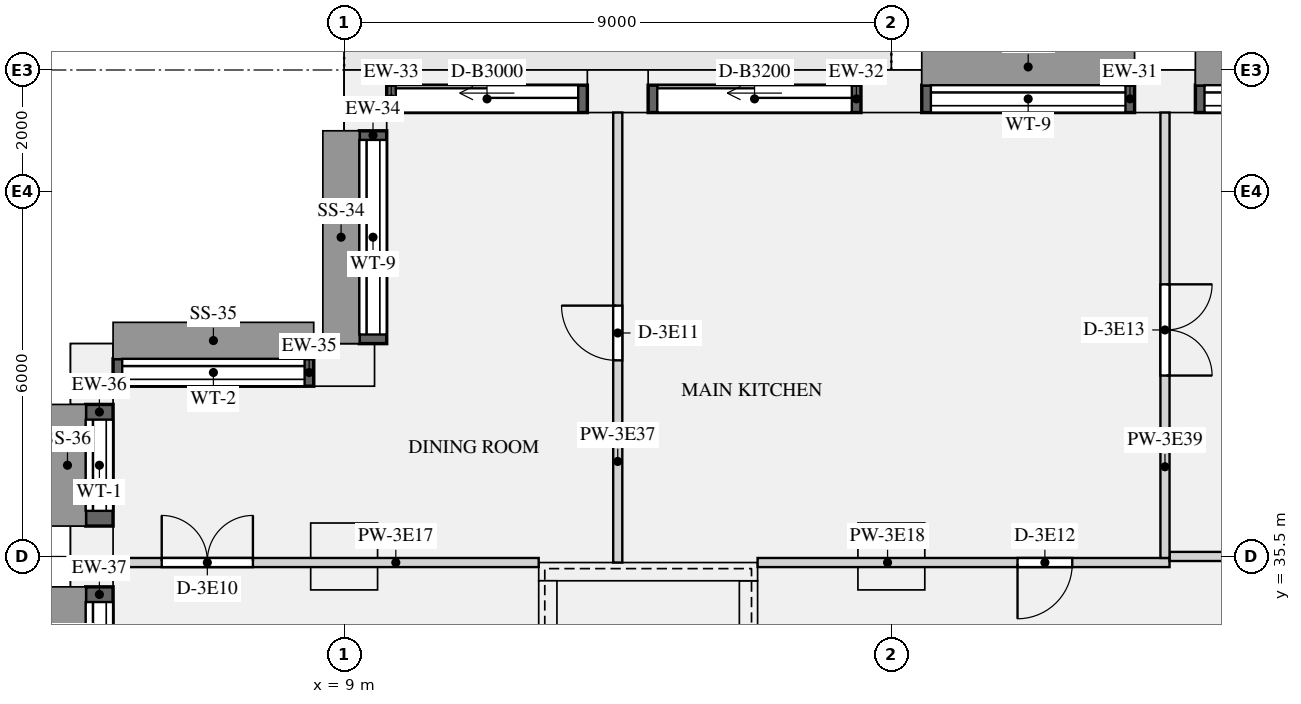
"""IFC4 building model, lengths in metres.
Left out: names, types, materials, properties, quantities, classifications, styles, units other than length and angle.
Written with IfcOpenShell. Run it as: python <this file> out.ifc"""

import sys

from ifc_helpers import new_model, si_unit, direction, frame, frame_2d, origin, origin_2d, place, context, subcontext, project, spatial, rectangle, extrude, element, fill, save


model = new_model("IFC4")
c1 = context("Model", 3, precision=1e-05, world=origin(), true_north=direction((0.0, 1.0)))
c2 = subcontext(c1, "Body", "Model", "MODEL_VIEW")
j1 = project(units=[si_unit("LENGTHUNIT", "METRE"), si_unit("PLANEANGLEUNIT", "RADIAN")], contexts=[c1])
p1 = place(None, origin())
s1 = spatial("IfcSite", under=j1, at=p1, CompositionType="ELEMENT")
p2 = place(p1, origin())
s2 = spatial("IfcBuilding", under=s1, at=p2, CompositionType="ELEMENT")
p3 = place(p2, frame((0.0, 0.0, 172.8)))
s3 = spatial("IfcBuildingStorey", under=s2, at=p3, CompositionType="ELEMENT", Elevation=172.8)
for number, where, z_axis, x_axis in (
    (1, (22.5, 43.15, 0.0), (0.0, 0.0, 1.0), (-1.0, 0.0, 0.0)),
    (2, (18.0, 43.15, 0.0), (0.0, 0.0, 1.0), (-1.0, 0.0, 0.0)),
    (3, (13.5, 43.15, 0.0), (0.0, 0.0, 1.0), (-1.0, 0.0, 0.0)),
    (4, (9.35, 43.0, 0.0), (0.0, 0.0, 1.0), (0.0, -1.0, 0.0)),
    (5, (9.0, 38.65, 0.0), (0.0, 0.0, 1.0), (-1.0, 0.0, 0.0)),
    (6, (4.85, 38.5, 0.0), (0.0, 0.0, 1.0), (0.0, -1.0, 0.0)),
    (7, (4.85, 35.5, 0.0), (0.0, 0.0, 1.0), (0.0, -1.0, 0.0)),
):
    element("IfcColumn", number, at=place(p3, frame(where, z_axis=z_axis, x_axis=x_axis)), inside=s3, PredefinedType="USERDEFINED", context=c2, shape_type="SweptSolid", body=[
        extrude(rectangle(XDim=1.0, YDim=0.7, at=origin_2d()), origin(), (0.0, 0.0, 1.0), 3.15),
    ])
for number, where, z_axis, x_axis in (
    (8, (9.0, 35.5, 0.0), (0.0, 0.0, 1.0), (1.0, 0.0, 0.0)),
    (9, (18.0, 35.5, 0.0), (0.0, 0.0, 1.0), (1.0, 0.0, 0.0)),
):
    element("IfcColumn", number, at=place(p3, frame(where, z_axis=z_axis, x_axis=x_axis)), inside=s3, PredefinedType="COLUMN", context=c2, shape_type="SweptSolid", body=[
        extrude(rectangle(XDim=1.1, YDim=1.1, at=origin_2d()), origin(), (0.0, 0.0, 1.0), 3.15),
    ])
p4 = place(p3, frame((12.2, 35.25, 0.0), z_axis=(0.0, 0.0, 1.0), x_axis=(1.0, 0.0, 0.0)))
e10 = element("IfcWall", 10, at=p4, inside=s3, PredefinedType="SHEAR", context=c2, shape_type="SweptSolid", body=[
    extrude(rectangle(XDim=3.6, YDim=0.3, at=frame_2d((1.8, 0.0))), origin(), (0.0, 0.0, 1.0), 3.15),
])
for number, where, z_axis, x_axis in (
    (11, (12.35, 27.3, 0.0), (0.0, 0.0, 1.0), (0.0, 1.0, 0.0)),
    (12, (15.65, 27.3, 0.0), (0.0, 0.0, 1.0), (0.0, 1.0, 0.0)),
):
    element("IfcWall", number, at=place(p3, frame(where, z_axis=z_axis, x_axis=x_axis)), inside=s3, PredefinedType="SHEAR", context=c2, shape_type="SweptSolid", body=[
        extrude(rectangle(XDim=7.8, YDim=0.3, at=frame_2d((3.9, 0.0))), origin(), (0.0, 0.0, 1.0), 3.15),
    ])
p5 = place(p3, frame((26.5, 43.025, 0.9), z_axis=(0.0, 0.0, 1.0), x_axis=(-1.0, 0.0, 0.0)))
e13 = element("IfcWall", 13, at=p5, inside=s3, PredefinedType="SOLIDWALL", context=c2, shape_type="SweptSolid", body=[
    extrude(rectangle(XDim=3.5, YDim=0.45, at=frame_2d((1.75, 0.0))), origin(), (0.0, 0.0, 1.0), 1.93),
])
p6 = place(p5, frame((0.15, 0.0, 0.15)))
e14 = element("IfcOpeningElement", 14, at=p6, cuts=e13, PredefinedType="OPENING", context=c2, shape_type="SweptSolid", body=[
    extrude(rectangle(XDim=3.2, YDim=1.5, at=frame_2d((1.6, 0.75))), frame((0.0, 0.235, 0.0), z_axis=(0.0, -1.0, 0.0), x_axis=(1.0, 0.0, 0.0)), (0.0, 0.0, 1.0), 0.47),
])
p7 = place(p3, frame((22.0, 43.025, 0.9), z_axis=(0.0, 0.0, 1.0), x_axis=(-1.0, 0.0, 0.0)))
e15 = element("IfcWall", 15, at=p7, inside=s3, PredefinedType="SOLIDWALL", context=c2, shape_type="SweptSolid", body=[
    extrude(rectangle(XDim=3.5, YDim=0.45, at=frame_2d((1.75, 0.0))), origin(), (0.0, 0.0, 1.0), 1.93),
])
p8 = place(p7, frame((0.15, 0.0, 0.15)))
e16 = element("IfcOpeningElement", 16, at=p8, cuts=e15, PredefinedType="OPENING", context=c2, shape_type="SweptSolid", body=[
    extrude(rectangle(XDim=3.2, YDim=1.5, at=frame_2d((1.6, 0.75))), frame((0.0, 0.235, 0.0), z_axis=(0.0, -1.0, 0.0), x_axis=(1.0, 0.0, 0.0)), (0.0, 0.0, 1.0), 0.47),
])
p9 = place(p3, frame((17.5, 43.025, 0.0), z_axis=(0.0, 0.0, 1.0), x_axis=(-1.0, 0.0, 0.0)))
e17 = element("IfcWall", 17, at=p9, inside=s3, PredefinedType="SOLIDWALL", context=c2, shape_type="SweptSolid", body=[
    extrude(rectangle(XDim=3.5, YDim=0.45, at=frame_2d((1.75, 0.0))), origin(), (0.0, 0.0, 1.0), 2.83),
])
p10 = place(p9, frame((0.15, 0.0, 0.0)))
e18 = element("IfcOpeningElement", 18, at=p10, cuts=e17, PredefinedType="OPENING", context=c2, shape_type="SweptSolid", body=[
    extrude(rectangle(XDim=3.2, YDim=2.3, at=frame_2d((1.6, 1.15))), frame((0.0, 0.235, 0.0), z_axis=(0.0, -1.0, 0.0), x_axis=(1.0, 0.0, 0.0)), (0.0, 0.0, 1.0), 0.47),
])
p11 = place(p3, frame((13.0, 43.025, 0.0), z_axis=(0.0, 0.0, 1.0), x_axis=(-1.0, 0.0, 0.0)))
e19 = element("IfcWall", 19, at=p11, inside=s3, PredefinedType="SOLIDWALL", context=c2, shape_type="SweptSolid", body=[
    extrude(rectangle(XDim=3.3, YDim=0.45, at=frame_2d((1.65, 0.0))), origin(), (0.0, 0.0, 1.0), 2.83),
])
p12 = place(p11, frame((0.15, 0.0, 0.0)))
e20 = element("IfcOpeningElement", 20, at=p12, cuts=e19, PredefinedType="OPENING", context=c2, shape_type="SweptSolid", body=[
    extrude(rectangle(XDim=3.0, YDim=2.3, at=frame_2d((1.5, 1.15))), frame((0.0, 0.235, 0.0), z_axis=(0.0, -1.0, 0.0), x_axis=(1.0, 0.0, 0.0)), (0.0, 0.0, 1.0), 0.47),
])
p13 = place(p3, frame((9.475, 42.5, 0.9), z_axis=(0.0, 0.0, 1.0), x_axis=(0.0, -1.0, 0.0)))
e21 = element("IfcWall", 21, at=p13, inside=s3, PredefinedType="SOLIDWALL", context=c2, shape_type="SweptSolid", body=[
    extrude(rectangle(XDim=3.5, YDim=0.45, at=frame_2d((1.75, 0.0))), origin(), (0.0, 0.0, 1.0), 1.93),
])
p14 = place(p13, frame((0.15, 0.0, 0.15)))
e22 = element("IfcOpeningElement", 22, at=p14, cuts=e21, PredefinedType="OPENING", context=c2, shape_type="SweptSolid", body=[
    extrude(rectangle(XDim=3.2, YDim=1.5, at=frame_2d((1.6, 0.75))), frame((0.0, 0.235, 0.0), z_axis=(0.0, -1.0, 0.0), x_axis=(1.0, 0.0, 0.0)), (0.0, 0.0, 1.0), 0.47),
])
p15 = place(p3, frame((8.5, 38.525, 0.9), z_axis=(0.0, 0.0, 1.0), x_axis=(-1.0, 0.0, 0.0)))
e23 = element("IfcWall", 23, at=p15, inside=s3, PredefinedType="SOLIDWALL", context=c2, shape_type="SweptSolid", body=[
    extrude(rectangle(XDim=3.3, YDim=0.45, at=frame_2d((1.65, 0.0))), origin(), (0.0, 0.0, 1.0), 1.93),
])
p16 = place(p15, frame((0.15, 0.0, 0.15)))
e24 = element("IfcOpeningElement", 24, at=p16, cuts=e23, PredefinedType="OPENING", context=c2, shape_type="SweptSolid", body=[
    extrude(rectangle(XDim=3.0, YDim=1.5, at=frame_2d((1.5, 0.75))), frame((0.0, 0.235, 0.0), z_axis=(0.0, -1.0, 0.0), x_axis=(1.0, 0.0, 0.0)), (0.0, 0.0, 1.0), 0.47),
])
p17 = place(p3, frame((4.975, 38.0, 0.9), z_axis=(0.0, 0.0, 1.0), x_axis=(0.0, -1.0, 0.0)))
e25 = element("IfcWall", 25, at=p17, inside=s3, PredefinedType="SOLIDWALL", context=c2, shape_type="SweptSolid", body=[
    extrude(rectangle(XDim=2.0, YDim=0.45, at=frame_2d((1.0, 0.0))), origin(), (0.0, 0.0, 1.0), 1.93),
])
p18 = place(p17, frame((0.25, 0.0, 0.15)))
e26 = element("IfcOpeningElement", 26, at=p18, cuts=e25, PredefinedType="OPENING", context=c2, shape_type="SweptSolid", body=[
    extrude(rectangle(XDim=1.5, YDim=1.5, at=frame_2d((0.75, 0.75))), frame((0.0, 0.235, 0.0), z_axis=(0.0, -1.0, 0.0), x_axis=(1.0, 0.0, 0.0)), (0.0, 0.0, 1.0), 0.47),
])
p19 = place(p3, frame((4.975, 35.0, 0.9), z_axis=(0.0, 0.0, 1.0), x_axis=(0.0, -1.0, 0.0)))
e27 = element("IfcWall", 27, at=p19, inside=s3, PredefinedType="SOLIDWALL", context=c2, shape_type="SweptSolid", body=[
    extrude(rectangle(XDim=2.5, YDim=0.45, at=frame_2d((1.25, 0.0))), origin(), (0.0, 0.0, 1.0), 1.93),
])
p20 = place(p19, frame((0.25, 0.0, 0.15)))
e28 = element("IfcOpeningElement", 28, at=p20, cuts=e27, PredefinedType="OPENING", context=c2, shape_type="SweptSolid", body=[
    extrude(rectangle(XDim=2.0, YDim=1.5, at=frame_2d((1.0, 0.75))), frame((0.0, 0.235, 0.0), z_axis=(0.0, -1.0, 0.0), x_axis=(1.0, 0.0, 0.0)), (0.0, 0.0, 1.0), 0.47),
])
p21 = place(p3, frame((5.2, 35.4, 0.0), z_axis=(0.0, 0.0, 1.0), x_axis=(1.0, 0.0, 0.0)))
e29 = element("IfcWall", 29, at=p21, inside=s3, PredefinedType="PARTITIONING", context=c2, shape_type="SweptSolid", body=[
    extrude(rectangle(XDim=7.0, YDim=0.15, at=frame_2d((3.5, 0.0))), origin(), (0.0, 0.0, 1.0), 2.83),
])
p22 = place(p21, frame((0.8, 0.0, 0.0)))
e30 = element("IfcOpeningElement", 30, at=p22, cuts=e29, PredefinedType="OPENING", context=c2, shape_type="SweptSolid", body=[
    extrude(rectangle(XDim=1.5, YDim=2.1, at=frame_2d((0.75, 1.05))), frame((0.0, 0.085, 0.0), z_axis=(0.0, -1.0, 0.0), x_axis=(1.0, 0.0, 0.0)), (0.0, 0.0, 1.0), 0.17),
])
p23 = place(p3, frame((15.8, 35.4, 0.0), z_axis=(0.0, 0.0, 1.0), x_axis=(1.0, 0.0, 0.0)))
e31 = element("IfcWall", 31, at=p23, inside=s3, PredefinedType="PARTITIONING", context=c2, shape_type="SweptSolid", body=[
    extrude(rectangle(XDim=6.775, YDim=0.15, at=frame_2d((3.387, 0.0))), origin(), (0.0, 0.0, 1.0), 2.83),
])
p24 = place(p23, frame((4.275, 0.0, 0.0)))
e32 = element("IfcOpeningElement", 32, at=p24, cuts=e31, PredefinedType="OPENING", context=c2, shape_type="SweptSolid", body=[
    extrude(rectangle(XDim=0.9, YDim=2.1, at=frame_2d((0.45, 1.05))), frame((0.0, 0.085, 0.0), z_axis=(0.0, -1.0, 0.0), x_axis=(1.0, 0.0, 0.0)), (0.0, 0.0, 1.0), 0.17),
])
p25 = place(p3, frame((22.575, 35.5, 0.0), z_axis=(0.0, 0.0, 1.0), x_axis=(1.0, 0.0, 0.0)))
e33 = element("IfcWall", 33, at=p25, inside=s3, PredefinedType="PARTITIONING", context=c2, shape_type="SweptSolid", body=[
    extrude(rectangle(XDim=4.425, YDim=0.15, at=frame_2d((2.212, 0.0))), origin(), (0.0, 0.0, 1.0), 2.83),
])
p26 = place(p3, frame((13.5, 35.4, 0.0), z_axis=(0.0, 0.0, 1.0), x_axis=(0.0, 1.0, 0.0)))
e34 = element("IfcWall", 34, at=p26, inside=s3, PredefinedType="PARTITIONING", context=c2, shape_type="SweptSolid", body=[
    extrude(rectangle(XDim=7.4, YDim=0.15, at=frame_2d((3.7, 0.0))), origin(), (0.0, 0.0, 1.0), 2.83),
])
p27 = place(p26, frame((3.325, 0.0, 0.0)))
e35 = element("IfcOpeningElement", 35, at=p27, cuts=e34, PredefinedType="OPENING", context=c2, shape_type="SweptSolid", body=[
    extrude(rectangle(XDim=0.9, YDim=2.1, at=frame_2d((0.45, 1.05))), frame((0.0, 0.085, 0.0), z_axis=(0.0, -1.0, 0.0), x_axis=(1.0, 0.0, 0.0)), (0.0, 0.0, 1.0), 0.17),
])
p28 = place(p3, frame((22.5, 35.475, 0.0), z_axis=(0.0, 0.0, 1.0), x_axis=(0.0, 1.0, 0.0)))
e36 = element("IfcWall", 36, at=p28, inside=s3, PredefinedType="PARTITIONING", context=c2, shape_type="SweptSolid", body=[
    extrude(rectangle(XDim=7.325, YDim=0.15, at=frame_2d((3.663, 0.0))), origin(), (0.0, 0.0, 1.0), 2.83),
])
p29 = place(p28, frame((3.0, 0.0, 0.0)))
e37 = element("IfcOpeningElement", 37, at=p29, cuts=e36, PredefinedType="OPENING", context=c2, shape_type="SweptSolid", body=[
    extrude(rectangle(XDim=1.5, YDim=2.1, at=frame_2d((0.75, 1.05))), frame((0.0, 0.085, 0.0), z_axis=(0.0, -1.0, 0.0), x_axis=(1.0, 0.0, 0.0)), (0.0, 0.0, 1.0), 0.17),
])
p30 = place(p6, origin())
e38 = element("IfcWindow", 38, at=p30, inside=s3, PartitioningType="SINGLE_PANEL", PredefinedType="WINDOW", context=c2, shape_type="SweptSolid", body=[
    extrude(rectangle(XDim=3.2, YDim=1.5, at=frame_2d((1.6, 0.75))), frame((0.0, -0.065, 0.0), z_axis=(0.0, -1.0, 0.0), x_axis=(1.0, 0.0, 0.0)), (0.0, 0.0, 1.0), 0.06),
])
fill(e14, e38)
p31 = place(p8, origin())
e39 = element("IfcWindow", 39, at=p31, inside=s3, PartitioningType="SINGLE_PANEL", PredefinedType="WINDOW", context=c2, shape_type="SweptSolid", body=[
    extrude(rectangle(XDim=3.2, YDim=1.5, at=frame_2d((1.6, 0.75))), frame((0.0, -0.065, 0.0), z_axis=(0.0, -1.0, 0.0), x_axis=(1.0, 0.0, 0.0)), (0.0, 0.0, 1.0), 0.06),
])
fill(e16, e39)
p32 = place(p10, origin())
e40 = element("IfcDoor", 40, at=p32, inside=s3, OperationType="SLIDING_TO_LEFT", PredefinedType="DOOR", context=c2, shape_type="SweptSolid", body=[
    extrude(rectangle(XDim=3.2, YDim=2.3, at=frame_2d((1.6, 1.15))), frame((0.0, -0.07, 0.0), z_axis=(0.0, -1.0, 0.0), x_axis=(1.0, 0.0, 0.0)), (0.0, 0.0, 1.0), 0.05),
])
fill(e18, e40)
p33 = place(p12, origin())
e41 = element("IfcDoor", 41, at=p33, inside=s3, OperationType="SLIDING_TO_LEFT", PredefinedType="DOOR", context=c2, shape_type="SweptSolid", body=[
    extrude(rectangle(XDim=3.0, YDim=2.3, at=frame_2d((1.5, 1.15))), frame((0.0, -0.07, 0.0), z_axis=(0.0, -1.0, 0.0), x_axis=(1.0, 0.0, 0.0)), (0.0, 0.0, 1.0), 0.05),
])
fill(e20, e41)
p34 = place(p14, origin())
e42 = element("IfcWindow", 42, at=p34, inside=s3, PartitioningType="SINGLE_PANEL", PredefinedType="WINDOW", context=c2, shape_type="SweptSolid", body=[
    extrude(rectangle(XDim=3.2, YDim=1.5, at=frame_2d((1.6, 0.75))), frame((0.0, -0.065, 0.0), z_axis=(0.0, -1.0, 0.0), x_axis=(1.0, 0.0, 0.0)), (0.0, 0.0, 1.0), 0.06),
])
fill(e22, e42)
p35 = place(p16, origin())
e43 = element("IfcWindow", 43, at=p35, inside=s3, PartitioningType="SINGLE_PANEL", PredefinedType="WINDOW", context=c2, shape_type="SweptSolid", body=[
    extrude(rectangle(XDim=3.0, YDim=1.5, at=frame_2d((1.5, 0.75))), frame((0.0, -0.065, 0.0), z_axis=(0.0, -1.0, 0.0), x_axis=(1.0, 0.0, 0.0)), (0.0, 0.0, 1.0), 0.06),
])
fill(e24, e43)
p36 = place(p18, origin())
e44 = element("IfcWindow", 44, at=p36, inside=s3, PartitioningType="SINGLE_PANEL", PredefinedType="WINDOW", context=c2, shape_type="SweptSolid", body=[
    extrude(rectangle(XDim=1.5, YDim=1.5, at=frame_2d((0.75, 0.75))), frame((0.0, -0.065, 0.0), z_axis=(0.0, -1.0, 0.0), x_axis=(1.0, 0.0, 0.0)), (0.0, 0.0, 1.0), 0.06),
])
fill(e26, e44)
p37 = place(p20, origin())
e45 = element("IfcWindow", 45, at=p37, inside=s3, PartitioningType="SINGLE_PANEL", PredefinedType="WINDOW", context=c2, shape_type="SweptSolid", body=[
    extrude(rectangle(XDim=2.0, YDim=1.5, at=frame_2d((1.0, 0.75))), frame((0.0, -0.065, 0.0), z_axis=(0.0, -1.0, 0.0), x_axis=(1.0, 0.0, 0.0)), (0.0, 0.0, 1.0), 0.06),
])
fill(e28, e45)
p38 = place(p22, origin())
e46 = element("IfcDoor", 46, at=p38, inside=s3, OperationType="DOUBLE_DOOR_SINGLE_SWING", PredefinedType="DOOR", context=c2, shape_type="SweptSolid", body=[
    extrude(rectangle(XDim=1.5, YDim=2.1, at=frame_2d((0.75, 1.05))), frame((0.0, 0.025, 0.0), z_axis=(0.0, -1.0, 0.0), x_axis=(1.0, 0.0, 0.0)), (0.0, 0.0, 1.0), 0.05),
])
fill(e30, e46)
p39 = place(p27, origin())
e47 = element("IfcDoor", 47, at=p39, inside=s3, OperationType="SINGLE_SWING_RIGHT", PredefinedType="DOOR", context=c2, shape_type="SweptSolid", body=[
    extrude(rectangle(XDim=0.9, YDim=2.1, at=frame_2d((0.45, 1.05))), frame((0.0, 0.025, 0.0), z_axis=(0.0, -1.0, 0.0), x_axis=(1.0, 0.0, 0.0)), (0.0, 0.0, 1.0), 0.05),
])
fill(e35, e47)
p40 = place(p24, frame((0.9, 0.0, 0.0), z_axis=(0.0, 0.0, 1.0), x_axis=(-1.0, 0.0, 0.0)))
e48 = element("IfcDoor", 48, at=p40, inside=s3, OperationType="SINGLE_SWING_RIGHT", PredefinedType="DOOR", context=c2, shape_type="SweptSolid", body=[
    extrude(rectangle(XDim=0.9, YDim=2.1, at=frame_2d((0.45, 1.05))), frame((0.0, 0.025, 0.0), z_axis=(0.0, -1.0, 0.0), x_axis=(1.0, 0.0, 0.0)), (0.0, 0.0, 1.0), 0.05),
])
fill(e32, e48)
p41 = place(p29, frame((1.5, 0.0, 0.0), z_axis=(0.0, 0.0, 1.0), x_axis=(-1.0, 0.0, 0.0)))
e49 = element("IfcDoor", 49, at=p41, inside=s3, OperationType="DOUBLE_DOOR_SINGLE_SWING", PredefinedType="DOOR", context=c2, shape_type="SweptSolid", body=[
    extrude(rectangle(XDim=1.5, YDim=2.1, at=frame_2d((0.75, 1.05))), frame((0.0, 0.025, 0.0), z_axis=(0.0, -1.0, 0.0), x_axis=(1.0, 0.0, 0.0)), (0.0, 0.0, 1.0), 0.05),
])
fill(e37, e49)
save(model, sys.argv[1])
